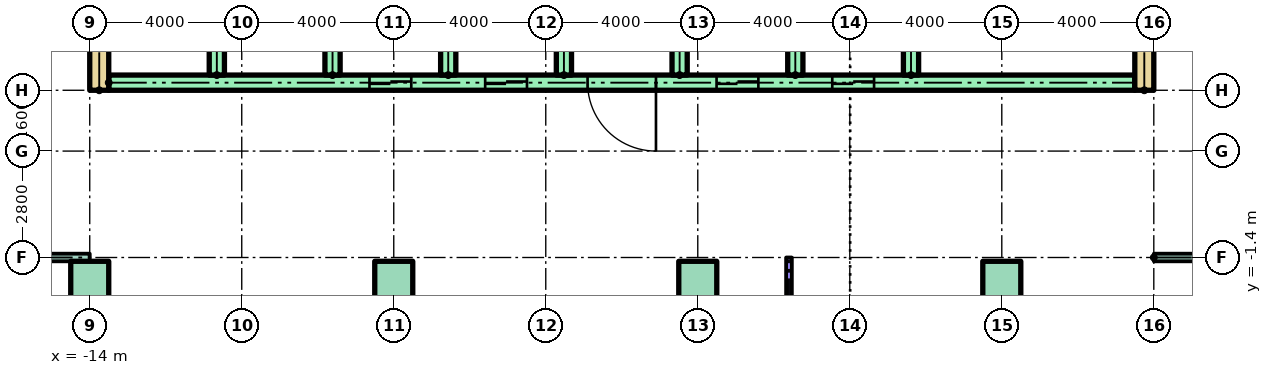
"""IFC4 building model, lengths in metres.
Left out: names, types, materials, properties, quantities, classifications, styles, units other than length and angle.
Written with IfcOpenShell. Run it as: python <this file> out.ifc"""

import sys

from ifc_helpers import new_model, si_unit, direction, frame, frame_2d, origin, origin_2d, place, context, subcontext, project, spatial, rectangle, extrude, element, fill, save


model = new_model("IFC4")
c1 = context("Model", 3, precision=1e-05, world=origin(), true_north=direction((0.0, 1.0)))
c2 = subcontext(c1, "Body", "Model", "MODEL_VIEW")
j1 = project(units=[si_unit("LENGTHUNIT", "METRE"), si_unit("PLANEANGLEUNIT", "RADIAN")], contexts=[c1])
p1 = place(None, origin())
s1 = spatial("IfcSite", under=j1, at=p1, CompositionType="ELEMENT")
p2 = place(p1, origin())
s2 = spatial("IfcBuilding", under=s1, at=p2, CompositionType="ELEMENT")
p3 = place(p2, frame((0.0, 0.0, 10.0)))
s3 = spatial("IfcBuildingStorey", under=s2, at=p3, CompositionType="ELEMENT", Elevation=10.0)
for number, where in (
    (1, (-14.0, -2.0, 0.0)),
    (2, (-6.0, -2.0, 0.0)),
    (3, (2.0, -2.0, 0.0)),
    (4, (10.0, -2.0, 0.0)),
):
    element("IfcColumn", number, at=place(p3, frame(where)), inside=s3, PredefinedType="COLUMN", context=c2, shape_type="SweptSolid", body=[
        extrude(rectangle(XDim=1.0, YDim=1.0, at=origin_2d()), origin(), (0.0, 0.0, 1.0), 4.0),
    ])
for number, where, z_axis, x_axis in (
    (5, (-13.75, 3.0, 0.0), (0.0, 0.0, 1.0), (0.0, 1.0, 0.0)),
    (6, (13.75, 3.0, 0.0), (0.0, 0.0, 1.0), (0.0, 1.0, 0.0)),
):
    element("IfcWall", number, at=place(p3, frame(where, z_axis=z_axis, x_axis=x_axis)), inside=s3, PredefinedType="SHEAR", context=c2, shape_type="SweptSolid", body=[
        extrude(rectangle(XDim=17.0, YDim=0.5, at=frame_2d((8.5, 0.0))), origin(), (0.0, 0.0, 1.0), 3.7),
    ])
p4 = place(p3, frame((-13.5, 3.2, 0.0)))
e7 = element("IfcWall", 7, at=p4, inside=s3, PredefinedType="SHEAR", context=c2, shape_type="SweptSolid", body=[
    extrude(rectangle(XDim=27.0, YDim=0.4, at=frame_2d((13.5, 0.0))), origin(), (0.0, 0.0, 1.0), 3.7),
])
p5 = place(p4, frame((6.861, 0.0, 0.0)))
e8 = element("IfcOpeningElement", 8, at=p5, cuts=e7, PredefinedType="OPENING", context=c2, shape_type="SweptSolid", body=[
    extrude(rectangle(XDim=1.1, YDim=2.1, at=frame_2d((0.55, 1.05))), frame((0.0, 0.21, 0.0), z_axis=(0.0, -1.0, 0.0), x_axis=(1.0, 0.0, 0.0)), (0.0, 0.0, 1.0), 0.42),
])
p6 = place(p4, frame((9.906, 0.0, 0.0)))
e9 = element("IfcOpeningElement", 9, at=p6, cuts=e7, PredefinedType="OPENING", context=c2, shape_type="SweptSolid", body=[
    extrude(rectangle(XDim=1.1, YDim=2.1, at=frame_2d((0.55, 1.05))), frame((0.0, 0.21, 0.0), z_axis=(0.0, -1.0, 0.0), x_axis=(1.0, 0.0, 0.0)), (0.0, 0.0, 1.0), 0.42),
])
p7 = place(p4, frame((15.994, 0.0, 0.0)))
e10 = element("IfcOpeningElement", 10, at=p7, cuts=e7, PredefinedType="OPENING", context=c2, shape_type="SweptSolid", body=[
    extrude(rectangle(XDim=1.1, YDim=2.1, at=frame_2d((0.55, 1.05))), frame((0.0, 0.21, 0.0), z_axis=(0.0, -1.0, 0.0), x_axis=(1.0, 0.0, 0.0)), (0.0, 0.0, 1.0), 0.42),
])
p8 = place(p4, frame((19.039, 0.0, 0.0)))
e11 = element("IfcOpeningElement", 11, at=p8, cuts=e7, PredefinedType="OPENING", context=c2, shape_type="SweptSolid", body=[
    extrude(rectangle(XDim=1.1, YDim=2.1, at=frame_2d((0.55, 1.05))), frame((0.0, 0.21, 0.0), z_axis=(0.0, -1.0, 0.0), x_axis=(1.0, 0.0, 0.0)), (0.0, 0.0, 1.0), 0.42),
])
p9 = place(p4, frame((12.6, 0.0, 0.0)))
e12 = element("IfcOpeningElement", 12, at=p9, cuts=e7, PredefinedType="OPENING", context=c2, shape_type="SweptSolid", body=[
    extrude(rectangle(XDim=1.8, YDim=2.1, at=frame_2d((0.9, 1.05))), frame((0.0, 0.21, 0.0), z_axis=(0.0, -1.0, 0.0), x_axis=(1.0, 0.0, 0.0)), (0.0, 0.0, 1.0), 0.42),
])
for number, where, z_axis, x_axis in (
    (13, (-10.656, 3.4, 0.0), (0.0, 0.0, 1.0), (0.0, 1.0, 0.0)),
    (14, (-7.611, 3.4, 0.0), (0.0, 0.0, 1.0), (0.0, 1.0, 0.0)),
    (15, (-4.567, 3.4, 0.0), (0.0, 0.0, 1.0), (0.0, 1.0, 0.0)),
    (16, (-1.522, 3.4, 0.0), (0.0, 0.0, 1.0), (0.0, 1.0, 0.0)),
    (17, (1.522, 3.4, 0.0), (0.0, 0.0, 1.0), (0.0, 1.0, 0.0)),
    (18, (4.567, 3.4, 0.0), (0.0, 0.0, 1.0), (0.0, 1.0, 0.0)),
    (19, (7.611, 3.4, 0.0), (0.0, 0.0, 1.0), (0.0, 1.0, 0.0)),
):
    element("IfcWall", number, at=place(p3, frame(where, z_axis=z_axis, x_axis=x_axis)), inside=s3, PredefinedType="SHEAR", context=c2, shape_type="SweptSolid", body=[
        extrude(rectangle(XDim=3.0, YDim=0.4, at=frame_2d((1.5, 0.0))), origin(), (0.0, 0.0, 1.0), 3.7),
    ])
for number, where in (
    (20, (-36.9, -1.4, 0.0)),
    (21, (14.0, -1.4, 0.0)),
):
    element("IfcWall", number, at=place(p3, frame(where)), inside=s3, PredefinedType="PARTITIONING", context=c2, shape_type="SweptSolid", body=[
        extrude(rectangle(XDim=22.9, YDim=0.2, at=frame_2d((11.45, 0.0))), origin(), (0.0, 0.0, 1.0), 3.7),
    ])
p10 = place(p3, frame((4.4, -6.25, 0.0), z_axis=(0.0, 0.0, 1.0), x_axis=(0.0, 1.0, 0.0)))
e22 = element("IfcWall", 22, at=p10, inside=s3, PredefinedType="PARTITIONING", context=c2, shape_type="SweptSolid", body=[
    extrude(rectangle(XDim=4.85, YDim=0.15, at=frame_2d((2.425, 0.0))), origin(), (0.0, 0.0, 1.0), 3.7),
])
p11 = place(p5, origin())
e23 = element("IfcDoor", 23, at=p11, inside=s3, OperationType="SLIDING_TO_LEFT", PredefinedType="DOOR", context=c2, shape_type="SweptSolid", body=[
    extrude(rectangle(XDim=1.1, YDim=2.1, at=frame_2d((0.55, 1.05))), frame((0.0, 0.025, 0.0), z_axis=(0.0, -1.0, 0.0), x_axis=(1.0, 0.0, 0.0)), (0.0, 0.0, 1.0), 0.05),
])
fill(e8, e23)
p12 = place(p6, origin())
e24 = element("IfcDoor", 24, at=p12, inside=s3, OperationType="SLIDING_TO_LEFT", PredefinedType="DOOR", context=c2, shape_type="SweptSolid", body=[
    extrude(rectangle(XDim=1.1, YDim=2.1, at=frame_2d((0.55, 1.05))), frame((0.0, 0.025, 0.0), z_axis=(0.0, -1.0, 0.0), x_axis=(1.0, 0.0, 0.0)), (0.0, 0.0, 1.0), 0.05),
])
fill(e9, e24)
p13 = place(p7, origin())
e25 = element("IfcDoor", 25, at=p13, inside=s3, OperationType="SLIDING_TO_LEFT", PredefinedType="DOOR", context=c2, shape_type="SweptSolid", body=[
    extrude(rectangle(XDim=1.1, YDim=2.1, at=frame_2d((0.55, 1.05))), frame((0.0, 0.025, 0.0), z_axis=(0.0, -1.0, 0.0), x_axis=(1.0, 0.0, 0.0)), (0.0, 0.0, 1.0), 0.05),
])
fill(e10, e25)
p14 = place(p8, origin())
e26 = element("IfcDoor", 26, at=p14, inside=s3, OperationType="SLIDING_TO_LEFT", PredefinedType="DOOR", context=c2, shape_type="SweptSolid", body=[
    extrude(rectangle(XDim=1.1, YDim=2.1, at=frame_2d((0.55, 1.05))), frame((0.0, 0.025, 0.0), z_axis=(0.0, -1.0, 0.0), x_axis=(1.0, 0.0, 0.0)), (0.0, 0.0, 1.0), 0.05),
])
fill(e11, e26)
p15 = place(p9, frame((1.8, 0.0, 0.0), z_axis=(0.0, 0.0, 1.0), x_axis=(-1.0, 0.0, 0.0)))
e27 = element("IfcDoor", 27, at=p15, inside=s3, OperationType="DOUBLE_DOOR_SINGLE_SWING", PredefinedType="DOOR", context=c2, shape_type="SweptSolid", body=[
    extrude(rectangle(XDim=1.8, YDim=2.1, at=frame_2d((0.9, 1.05))), frame((0.0, 0.025, 0.0), z_axis=(0.0, -1.0, 0.0), x_axis=(1.0, 0.0, 0.0)), (0.0, 0.0, 1.0), 0.05),
])
fill(e12, e27)
save(model, sys.argv[1])
